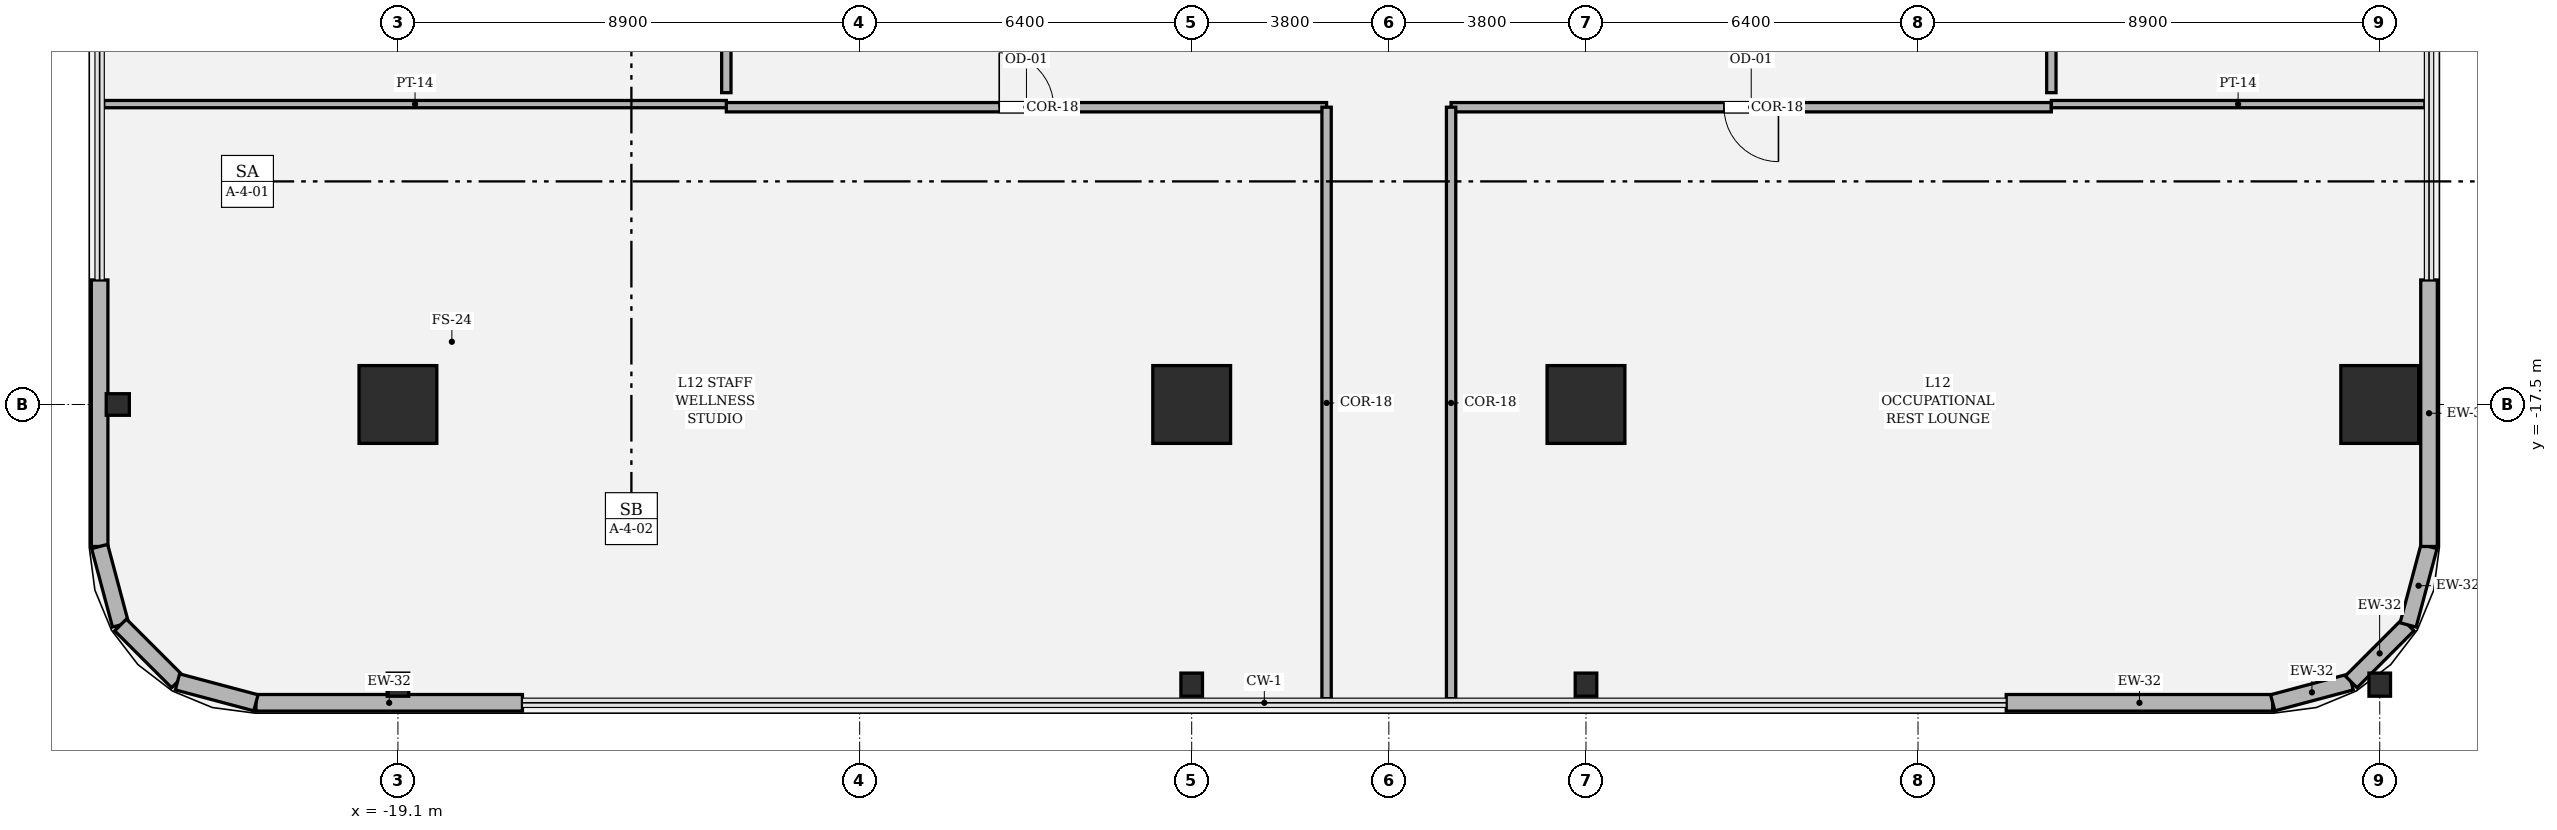
"""IFC4 building model, lengths in metres.
Left out: names, types, materials, properties, quantities, classifications, styles, units other than length and angle.
Written with IfcOpenShell. Run it as: python <this file> out.ifc"""

import sys

from ifc_helpers import new_model, si_unit, direction, frame, frame_2d, origin, origin_2d, place, context, subcontext, project, spatial, rectangle, hollow_rectangle, i_section, extrude, element, fill, save


model = new_model("IFC4")
c1 = context("Model", 3, precision=1e-05, world=origin(), true_north=direction((0.0, 1.0)))
c2 = subcontext(c1, "Body", "Model", "MODEL_VIEW")
j1 = project(units=[si_unit("LENGTHUNIT", "METRE"), si_unit("PLANEANGLEUNIT", "RADIAN")], contexts=[c1])
p1 = place(None, origin())
s1 = spatial("IfcSite", under=j1, at=p1, CompositionType="ELEMENT")
p2 = place(p1, origin())
s2 = spatial("IfcBuilding", under=s1, at=p2, CompositionType="ELEMENT")
p3 = place(p2, frame((0.0, 0.0, 56.55)))
s3 = spatial("IfcBuildingStorey", under=s2, at=p3, CompositionType="ELEMENT", Elevation=56.55)
for number, where, z_axis, x_axis in (
    (1, (-19.1, -17.5, 0.0), (0.0, 0.0, 1.0), (1.0, 0.0, 0.0)),
    (2, (-3.8, -17.5, 0.0), (0.0, 0.0, 1.0), (1.0, 0.0, 0.0)),
    (3, (3.8, -17.5, 0.0), (0.0, 0.0, 1.0), (1.0, 0.0, 0.0)),
    (4, (19.1, -17.5, 0.0), (0.0, 0.0, 1.0), (1.0, 0.0, 0.0)),
):
    element("IfcColumn", number, at=place(p3, frame(where, z_axis=z_axis, x_axis=x_axis)), inside=s3, PredefinedType="COLUMN", context=c2, shape_type="SweptSolid", body=[
        extrude(hollow_rectangle(XDim=1.5, YDim=1.5, WallThickness=0.045, at=origin_2d()), origin(), (0.0, 0.0, 1.0), 4.05),
    ])
for number, where, z_axis, x_axis in (
    (5, (-19.1, -22.9, 0.0), (0.0, 0.0, 1.0), (1.0, 0.0, 0.0)),
    (6, (-3.8, -22.9, 0.0), (0.0, 0.0, 1.0), (1.0, 0.0, 0.0)),
    (7, (3.8, -22.9, 0.0), (0.0, 0.0, 1.0), (1.0, 0.0, 0.0)),
    (8, (19.1, -22.9, 0.0), (0.0, 0.0, 1.0), (1.0, 0.0, 0.0)),
    (9, (-24.5, -17.5, 0.0), (0.0, 0.0, 1.0), (0.0, 1.0, 0.0)),
):
    element("IfcColumn", number, at=place(p3, frame(where, z_axis=z_axis, x_axis=x_axis)), inside=s3, PredefinedType="COLUMN", context=c2, shape_type="SweptSolid", body=[
        extrude(i_section(OverallWidth=0.416, OverallDepth=0.446, WebThickness=0.039, FlangeThickness=0.062, FilletRadius=0.018, at=origin_2d()), origin(), (0.0, 0.0, 1.0), 4.048),
    ])
for number, where, z_axis, x_axis in (
    (10, (-21.837, -23.25, 0.0), (0.0, 0.0, 1.0), (1.0, 0.0, 0.0)),
    (11, (11.9, -23.25, 0.0), (0.0, 0.0, 1.0), (1.0, 0.0, 0.0)),
):
    element("IfcWall", number, at=place(p3, frame(where, z_axis=z_axis, x_axis=x_axis)), inside=s3, PredefinedType="SOLIDWALL", context=c2, shape_type="SweptSolid", body=[
        extrude(rectangle(XDim=5.137, YDim=0.32, at=frame_2d((2.568, 0.0))), origin(), (0.0, 0.0, 1.0), 2.444),
    ])
p4 = place(p3, frame((17.037, -23.25, 0.0), z_axis=(0.0, 0.0, 1.0), x_axis=(0.966224582397, 0.257701486942, 0.0)))
e12 = element("IfcWall", 12, at=p4, inside=s3, PredefinedType="SOLIDWALL", context=c2, shape_type="SweptSolid", body=[
    extrude(rectangle(XDim=1.565, YDim=0.32, at=frame_2d((0.783, 0.0))), origin(), (0.0, 0.0, 1.0), 2.444),
])
p5 = place(p3, frame((18.549, -22.847, 0.0), z_axis=(0.0, 0.0, 1.0), x_axis=(0.707028130747, 0.707185422879, 0.0)))
e13 = element("IfcWall", 13, at=p5, inside=s3, PredefinedType="SOLIDWALL", context=c2, shape_type="SweptSolid", body=[
    extrude(rectangle(XDim=1.552, YDim=0.32, at=frame_2d((0.776, 0.0))), origin(), (0.0, 0.0, 1.0), 2.444),
])
p6 = place(p3, frame((19.646, -21.749, 0.0), z_axis=(0.0, 0.0, 1.0), x_axis=(0.257847112249, 0.966185730957, 0.0)))
e14 = element("IfcWall", 14, at=p6, inside=s3, PredefinedType="SOLIDWALL", context=c2, shape_type="SweptSolid", body=[
    extrude(rectangle(XDim=1.565, YDim=0.32, at=frame_2d((0.783, 0.0))), origin(), (0.0, 0.0, 1.0), 3.77),
])
p7 = place(p3, frame((20.05, -20.237, 0.0), z_axis=(0.0, 0.0, 1.0), x_axis=(0.0, 1.0, 0.0)))
e15 = element("IfcWall", 15, at=p7, inside=s3, PredefinedType="SOLIDWALL", context=c2, shape_type="SweptSolid", body=[
    extrude(rectangle(XDim=5.137, YDim=0.32, at=frame_2d((2.568, 0.0))), origin(), (0.0, 0.0, 1.0), 2.444),
])
p8 = place(p3, frame((-24.85, -15.1, 0.0), z_axis=(0.0, 0.0, 1.0), x_axis=(0.0, -1.0, 0.0)))
e16 = element("IfcWall", 16, at=p8, inside=s3, PredefinedType="SOLIDWALL", context=c2, shape_type="SweptSolid", body=[
    extrude(rectangle(XDim=5.137, YDim=0.32, at=frame_2d((2.568, 0.0))), origin(), (0.0, 0.0, 1.0), 3.77),
])
p9 = place(p3, frame((-24.85, -20.237, 0.0), z_axis=(0.0, 0.0, 1.0), x_axis=(0.257847112249, -0.966185730957, 0.0)))
e17 = element("IfcWall", 17, at=p9, inside=s3, PredefinedType="SOLIDWALL", context=c2, shape_type="SweptSolid", body=[
    extrude(rectangle(XDim=1.565, YDim=0.32, at=frame_2d((0.783, 0.0))), origin(), (0.0, 0.0, 1.0), 3.77),
])
p10 = place(p3, frame((-24.447, -21.749, 0.0), z_axis=(0.0, 0.0, 1.0), x_axis=(0.707028130747, -0.707185422879, 0.0)))
e18 = element("IfcWall", 18, at=p10, inside=s3, PredefinedType="SOLIDWALL", context=c2, shape_type="SweptSolid", body=[
    extrude(rectangle(XDim=1.552, YDim=0.32, at=frame_2d((0.776, 0.0))), origin(), (0.0, 0.0, 1.0), 3.77),
])
p11 = place(p3, frame((-23.349, -22.847, 0.0), z_axis=(0.0, 0.0, 1.0), x_axis=(0.966224582397, -0.257701486942, 0.0)))
e19 = element("IfcWall", 19, at=p11, inside=s3, PredefinedType="SOLIDWALL", context=c2, shape_type="SweptSolid", body=[
    extrude(rectangle(XDim=1.565, YDim=0.32, at=frame_2d((0.783, 0.0))), origin(), (0.0, 0.0, 1.0), 3.77),
])
p12 = place(p3, frame((-12.77, -11.77, 0.0), z_axis=(0.0, 0.0, 1.0), x_axis=(1.0, 0.0, 0.0)))
e20 = element("IfcWall", 20, at=p12, inside=s3, PredefinedType="PARTITIONING", context=c2, shape_type="SweptSolid", body=[
    extrude(rectangle(XDim=11.57, YDim=0.18, at=frame_2d((5.785, 0.0))), origin(), (0.0, 0.0, 1.0), 2.444),
])
p13 = place(p12, frame((5.26, 0.0, 0.0)))
e21 = element("IfcOpeningElement", 21, at=p13, cuts=e20, PredefinedType="OPENING", context=c2, shape_type="SweptSolid", body=[
    extrude(rectangle(XDim=1.05, YDim=2.2, at=frame_2d((0.525, 1.1))), frame((0.0, 0.1, 0.0), z_axis=(0.0, -1.0, 0.0), x_axis=(1.0, 0.0, 0.0)), (0.0, 0.0, 1.0), 0.2),
])
p14 = place(p3, frame((-1.2, -11.77, 0.0), z_axis=(0.0, 0.0, 1.0), x_axis=(0.0, -1.0, 0.0)))
e22 = element("IfcWall", 22, at=p14, inside=s3, PredefinedType="PARTITIONING", context=c2, shape_type="SweptSolid", body=[
    extrude(rectangle(XDim=11.4, YDim=0.18, at=frame_2d((5.7, 0.0))), origin(), (0.0, 0.0, 1.0), 2.444),
])
p15 = place(p3, frame((-24.77, -11.71, 0.0), z_axis=(0.0, 0.0, 1.0), x_axis=(1.0, 0.0, 0.0)))
e23 = element("IfcWall", 23, at=p15, inside=s3, PredefinedType="PARTITIONING", context=c2, shape_type="SweptSolid", body=[
    extrude(rectangle(XDim=12.0, YDim=0.14, at=frame_2d((6.0, 0.0))), origin(), (0.0, 0.0, 1.0), 2.444),
])
p16 = place(p3, frame((1.2, -11.77, 0.0), z_axis=(0.0, 0.0, 1.0), x_axis=(1.0, 0.0, 0.0)))
e24 = element("IfcWall", 24, at=p16, inside=s3, PredefinedType="PARTITIONING", context=c2, shape_type="SweptSolid", body=[
    extrude(rectangle(XDim=11.57, YDim=0.18, at=frame_2d((5.785, 0.0))), origin(), (0.0, 0.0, 1.0), 2.444),
])
p17 = place(p16, frame((5.26, 0.0, 0.0)))
e25 = element("IfcOpeningElement", 25, at=p17, cuts=e24, PredefinedType="OPENING", context=c2, shape_type="SweptSolid", body=[
    extrude(rectangle(XDim=1.05, YDim=2.2, at=frame_2d((0.525, 1.1))), frame((0.0, 0.1, 0.0), z_axis=(0.0, -1.0, 0.0), x_axis=(1.0, 0.0, 0.0)), (0.0, 0.0, 1.0), 0.2),
])
p18 = place(p3, frame((12.77, -11.71, 0.0), z_axis=(0.0, 0.0, 1.0), x_axis=(1.0, 0.0, 0.0)))
e26 = element("IfcWall", 26, at=p18, inside=s3, PredefinedType="PARTITIONING", context=c2, shape_type="SweptSolid", body=[
    extrude(rectangle(XDim=7.2, YDim=0.14, at=frame_2d((3.6, 0.0))), origin(), (0.0, 0.0, 1.0), 2.444),
])
p19 = place(p3, frame((1.2, -23.17, 0.0), z_axis=(0.0, 0.0, 1.0), x_axis=(0.0, 1.0, 0.0)))
e27 = element("IfcWall", 27, at=p19, inside=s3, PredefinedType="PARTITIONING", context=c2, shape_type="SweptSolid", body=[
    extrude(rectangle(XDim=11.4, YDim=0.18, at=frame_2d((5.7, 0.0))), origin(), (0.0, 0.0, 1.0), 2.444),
])
p20 = place(p3, frame((-12.77, -1.89, 0.0), z_axis=(0.0, 0.0, 1.0), x_axis=(0.0, -1.0, 0.0)))
e28 = element("IfcWall", 28, at=p20, inside=s3, PredefinedType="PARTITIONING", context=c2, shape_type="SweptSolid", body=[
    extrude(rectangle(XDim=9.6, YDim=0.18, at=frame_2d((4.8, 0.0))), origin(), (0.0, 0.0, 1.0), 2.444),
])
p21 = place(p20, frame((4.1, 0.0, 0.0)))
e29 = element("IfcOpeningElement", 29, at=p21, cuts=e28, PredefinedType="OPENING", context=c2, shape_type="SweptSolid", body=[
    extrude(rectangle(XDim=1.4, YDim=2.25, at=frame_2d((0.7, 1.125))), frame((0.0, 0.1, 0.0), z_axis=(0.0, -1.0, 0.0), x_axis=(1.0, 0.0, 0.0)), (0.0, 0.0, 1.0), 0.2),
])
p22 = place(p3, frame((12.77, -11.49, 0.0), z_axis=(0.0, 0.0, 1.0), x_axis=(0.0, 1.0, 0.0)))
e30 = element("IfcWall", 30, at=p22, inside=s3, PredefinedType="PARTITIONING", context=c2, shape_type="SweptSolid", body=[
    extrude(rectangle(XDim=13.38, YDim=0.18, at=frame_2d((6.69, 0.0))), origin(), (0.0, 0.0, 1.0), 2.444),
])
p23 = place(p22, frame((5.99, 0.0, 0.0)))
e31 = element("IfcOpeningElement", 31, at=p23, cuts=e30, PredefinedType="OPENING", context=c2, shape_type="SweptSolid", body=[
    extrude(rectangle(XDim=1.4, YDim=2.25, at=frame_2d((0.7, 1.125))), frame((0.0, 0.1, 0.0), z_axis=(0.0, -1.0, 0.0), x_axis=(1.0, 0.0, 0.0)), (0.0, 0.0, 1.0), 0.2),
])
p24 = place(p13, origin())
e32 = element("IfcDoor", 32, at=p24, inside=s3, OperationType="SINGLE_SWING_LEFT", PredefinedType="DOOR", context=c2, shape_type="SweptSolid", body=[
    extrude(rectangle(XDim=1.05, YDim=2.2, at=frame_2d((0.525, 1.1))), frame((0.0, 0.025, 0.0), z_axis=(0.0, -1.0, 0.0), x_axis=(1.0, 0.0, 0.0)), (0.0, 0.0, 1.0), 0.05),
])
fill(e21, e32)
p25 = place(p17, origin())
e33 = element("IfcDoor", 33, at=p25, inside=s3, OperationType="SINGLE_SWING_RIGHT", PredefinedType="DOOR", context=c2, shape_type="SweptSolid", body=[
    extrude(rectangle(XDim=1.05, YDim=2.2, at=frame_2d((0.525, 1.1))), frame((0.0, 0.025, 0.0), z_axis=(0.0, -1.0, 0.0), x_axis=(1.0, 0.0, 0.0)), (0.0, 0.0, 1.0), 0.05),
])
fill(e25, e33)
save(model, sys.argv[1])
